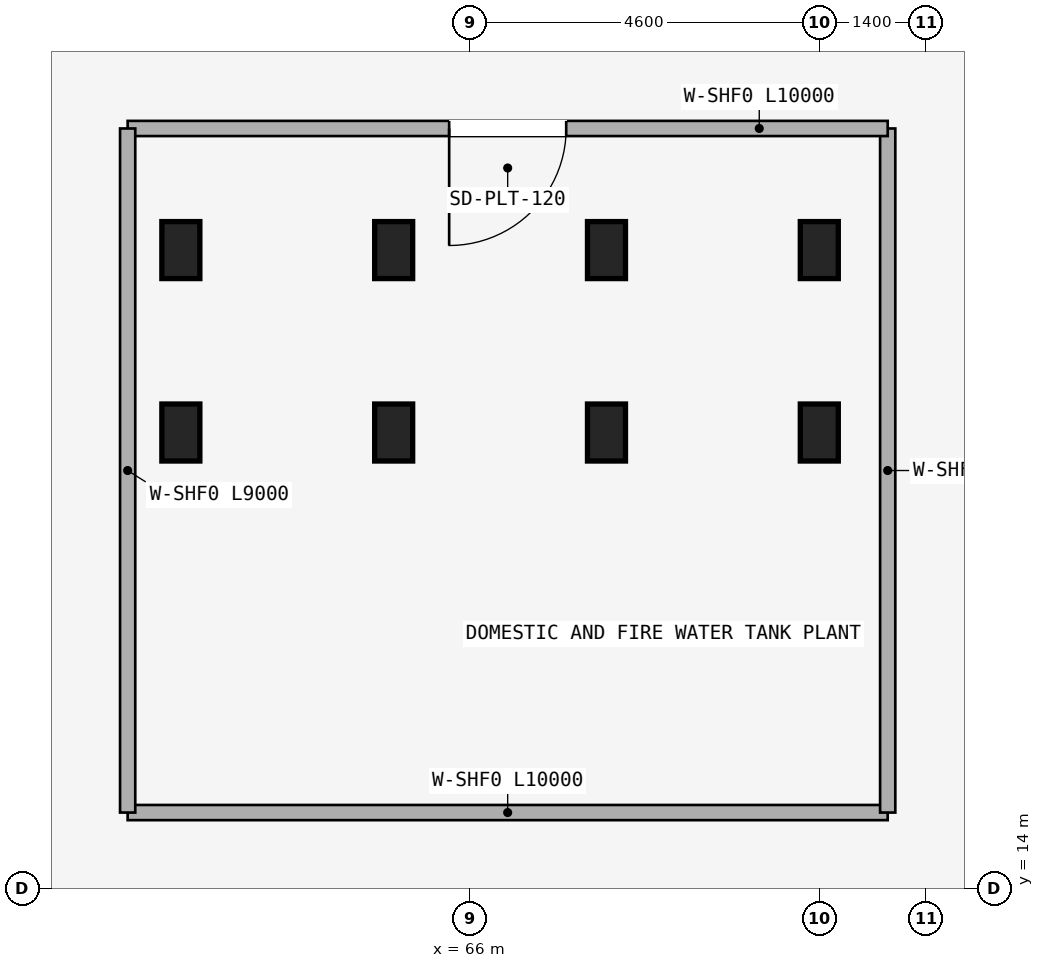
"""IFC4 building model, lengths in metres.
Left out: names, types, materials, properties, quantities, classifications, styles, units other than length and angle.
Written with IfcOpenShell. Run it as: python <this file> out.ifc"""

import sys

from ifc_helpers import new_model, si_unit, direction, frame, frame_2d, origin, origin_2d, place, context, subcontext, project, spatial, rectangle, extrude, element, fill, save


model = new_model("IFC4")
c1 = context("Model", 3, precision=1e-05, world=origin(), true_north=direction((0.0, 1.0)))
c2 = subcontext(c1, "Body", "Model", "MODEL_VIEW")
j1 = project(units=[si_unit("LENGTHUNIT", "METRE"), si_unit("PLANEANGLEUNIT", "RADIAN")], contexts=[c1])
p1 = place(None, origin())
s1 = spatial("IfcSite", under=j1, at=p1, CompositionType="ELEMENT")
p2 = place(p1, origin())
s2 = spatial("IfcBuilding", under=s1, at=p2, CompositionType="ELEMENT")
p3 = place(p2, frame((0.0, 0.0, -4.5)))
s3 = spatial("IfcBuildingStorey", under=s2, at=p3, CompositionType="ELEMENT", Elevation=-4.5)
for number, where, z_axis, x_axis in (
    (1, (62.2, 22.4, -0.5), (0.0, 0.0, 1.0), (1.0, 0.0, 0.0)),
    (2, (62.2, 20.0, -0.5), (0.0, 0.0, 1.0), (1.0, 0.0, 0.0)),
    (3, (65.0, 22.4, -0.5), (0.0, 0.0, 1.0), (1.0, 0.0, 0.0)),
    (4, (65.0, 20.0, -0.5), (0.0, 0.0, 1.0), (1.0, 0.0, 0.0)),
    (5, (67.8, 22.4, -0.5), (0.0, 0.0, 1.0), (1.0, 0.0, 0.0)),
    (6, (67.8, 20.0, -0.5), (0.0, 0.0, 1.0), (1.0, 0.0, 0.0)),
    (7, (70.6, 22.4, -0.5), (0.0, 0.0, 1.0), (1.0, 0.0, 0.0)),
    (8, (70.6, 20.0, -0.5), (0.0, 0.0, 1.0), (1.0, 0.0, 0.0)),
):
    element("IfcColumn", number, at=place(p3, frame(where, z_axis=z_axis, x_axis=x_axis)), inside=s3, PredefinedType="COLUMN", context=c2, shape_type="SweptSolid", body=[
        extrude(rectangle(XDim=0.5, YDim=0.75, at=origin_2d()), origin(), (0.0, 0.0, 1.0), 4.78),
    ])
p4 = place(p3, frame((61.5, 15.0, 0.0), z_axis=(0.0, 0.0, 1.0), x_axis=(1.0, 0.0, 0.0)))
e9 = element("IfcWall", 9, at=p4, inside=s3, PredefinedType="STANDARD", context=c2, shape_type="SweptSolid", body=[
    extrude(rectangle(XDim=10.0, YDim=0.2, at=frame_2d((5.0, 0.0))), origin(), (0.0, 0.0, 1.0), 3.622),
])
p5 = place(p3, frame((71.5, 15.0, 0.0), z_axis=(0.0, 0.0, 1.0), x_axis=(0.0, 1.0, 0.0)))
e10 = element("IfcWall", 10, at=p5, inside=s3, PredefinedType="STANDARD", context=c2, shape_type="SweptSolid", body=[
    extrude(rectangle(XDim=9.0, YDim=0.2, at=frame_2d((4.5, 0.0))), origin(), (0.0, 0.0, 1.0), 4.18),
])
p6 = place(p3, frame((71.5, 24.0, 0.0), z_axis=(0.0, 0.0, 1.0), x_axis=(-1.0, 0.0, 0.0)))
e11 = element("IfcWall", 11, at=p6, inside=s3, PredefinedType="STANDARD", context=c2, shape_type="SweptSolid", body=[
    extrude(rectangle(XDim=10.0, YDim=0.2, at=frame_2d((5.0, 0.0))), origin(), (0.0, 0.0, 1.0), 3.622),
])
p7 = place(p6, frame((4.23, 0.0, 0.0)))
e12 = element("IfcOpeningElement", 12, at=p7, cuts=e11, PredefinedType="OPENING", context=c2, shape_type="SweptSolid", body=[
    extrude(rectangle(XDim=1.54, YDim=2.15, at=frame_2d((0.77, 1.075))), frame((0.0, 0.11, 0.0), z_axis=(0.0, -1.0, 0.0), x_axis=(1.0, 0.0, 0.0)), (0.0, 0.0, 1.0), 0.22),
])
p8 = place(p3, frame((61.5, 24.0, 0.0), z_axis=(0.0, 0.0, 1.0), x_axis=(0.0, -1.0, 0.0)))
e13 = element("IfcWall", 13, at=p8, inside=s3, PredefinedType="STANDARD", context=c2, shape_type="SweptSolid", body=[
    extrude(rectangle(XDim=9.0, YDim=0.2, at=frame_2d((4.5, 0.0))), origin(), (0.0, 0.0, 1.0), 3.622),
])
p9 = place(p7, frame((1.54, 0.0, 0.0), z_axis=(0.0, 0.0, 1.0), x_axis=(-1.0, 0.0, 0.0)))
e14 = element("IfcDoor", 14, at=p9, inside=s3, OperationType="SINGLE_SWING_LEFT", PredefinedType="DOOR", context=c2, shape_type="SweptSolid", body=[
    extrude(rectangle(XDim=1.54, YDim=2.15, at=frame_2d((0.77, 1.075))), frame((0.0, 0.025, 0.0), z_axis=(0.0, -1.0, 0.0), x_axis=(1.0, 0.0, 0.0)), (0.0, 0.0, 1.0), 0.05),
])
fill(e12, e14)
save(model, sys.argv[1])
